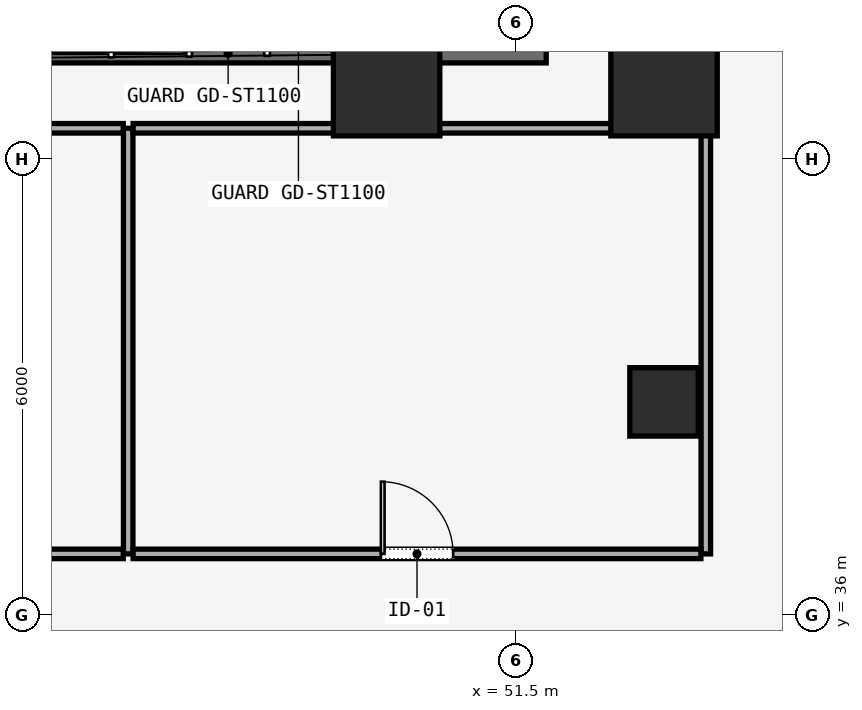
"""IFC4 building model, lengths in metres.
Left out: names, types, materials, properties, quantities, classifications, styles, units other than length and angle.
Written with IfcOpenShell. Run it as: python <this file> out.ifc"""

import sys

from ifc_helpers import new_model, si_unit, direction, frame, frame_2d, origin, origin_2d, place, context, subcontext, project, spatial, rectangle, extrude, element, fill, save


model = new_model("IFC4")
c1 = context("Model", 3, precision=1e-05, world=origin(), true_north=direction((0.0, 1.0)))
c2 = subcontext(c1, "Body", "Model", "MODEL_VIEW")
j1 = project(units=[si_unit("LENGTHUNIT", "METRE"), si_unit("PLANEANGLEUNIT", "RADIAN")], contexts=[c1])
p1 = place(None, origin())
s1 = spatial("IfcSite", under=j1, at=p1, CompositionType="ELEMENT")
p2 = place(p1, origin())
s2 = spatial("IfcBuilding", under=s1, at=p2, CompositionType="ELEMENT")
p3 = place(p2, frame((0.0, 0.0, -4.5)))
s3 = spatial("IfcBuildingStorey", under=s2, at=p3, CompositionType="ELEMENT", Elevation=-4.5)
for number, where, z_axis, x_axis in (
    (1, (49.8, 43.0, 0.0), (0.0, 0.0, 1.0), (1.0, 0.0, 0.0)),
    (2, (53.45, 43.0, 0.0), (0.0, 0.0, 1.0), (1.0, 0.0, 0.0)),
):
    element("IfcColumn", number, at=place(p3, frame(where, z_axis=z_axis, x_axis=x_axis)), inside=s3, PredefinedType="COLUMN", context=c2, shape_type="SweptSolid", body=[
        extrude(rectangle(XDim=1.4, YDim=1.4, at=origin_2d()), origin(), (0.0, 0.0, 1.0), 4.1),
    ])
p4 = place(p3, frame((53.45, 38.8, 0.0), z_axis=(0.0, 0.0, 1.0), x_axis=(1.0, 0.0, 0.0)))
e3 = element("IfcColumn", 3, at=p4, inside=s3, PredefinedType="COLUMN", context=c2, shape_type="SweptSolid", body=[
    extrude(rectangle(XDim=0.9, YDim=0.9, at=origin_2d()), origin(), (0.0, 0.0, 1.0), 4.1),
])
p5 = place(p3, frame((51.9, 43.36, 0.0), z_axis=(0.0, 0.0, 1.0), x_axis=(-1.0, 0.0, 0.0)))
e4 = element("IfcWall", 4, at=p5, inside=s3, PredefinedType="SOLIDWALL", context=c2, shape_type="SweptSolid", body=[
    extrude(rectangle(XDim=6.9, YDim=0.2, at=frame_2d((3.45, 0.0))), origin(), (0.0, 0.0, 1.0), 4.5),
])
p6 = place(p3, frame((46.4, 36.8, 0.0), z_axis=(0.0, 0.0, 1.0), x_axis=(0.0, 1.0, 0.0)))
e5 = element("IfcWall", 5, at=p6, inside=s3, PredefinedType="PARTITIONING", context=c2, shape_type="SweptSolid", body=[
    extrude(rectangle(XDim=5.6, YDim=0.125, at=frame_2d((2.8, 0.0))), origin(), (0.0, 0.0, 1.0), 3.143),
])
p7 = place(p3, frame((46.335, 42.4, 0.0), z_axis=(0.0, 0.0, 1.0), x_axis=(-1.0, 0.0, 0.0)))
e6 = element("IfcWall", 6, at=p7, inside=s3, PredefinedType="PARTITIONING", context=c2, shape_type="SweptSolid", body=[
    extrude(rectangle(XDim=8.27, YDim=0.125, at=frame_2d((4.135, 0.0))), origin(), (0.0, 0.0, 1.0), 3.143),
])
p8 = place(p3, frame((38.065, 36.8, 0.0), z_axis=(0.0, 0.0, 1.0), x_axis=(1.0, 0.0, 0.0)))
e7 = element("IfcWall", 7, at=p8, inside=s3, PredefinedType="PARTITIONING", context=c2, shape_type="SweptSolid", body=[
    extrude(rectangle(XDim=8.27, YDim=0.125, at=frame_2d((4.135, 0.0))), origin(), (0.0, 0.0, 1.0), 3.143),
])
p9 = place(p8, frame((2.76, 0.0, 0.0)))
e8 = element("IfcOpeningElement", 8, at=p9, cuts=e7, PredefinedType="OPENING", context=c2, shape_type="SweptSolid", body=[
    extrude(rectangle(XDim=0.95, YDim=2.2, at=frame_2d((0.475, 1.1))), frame((0.0, 0.062, 0.0), z_axis=(0.0, -1.0, 0.0), x_axis=(1.0, 0.0, 0.0)), (0.0, 0.0, 1.0), 0.125),
])
p10 = place(p3, frame((54.0, 36.8, 0.0), z_axis=(0.0, 0.0, 1.0), x_axis=(0.0, 1.0, 0.0)))
e9 = element("IfcWall", 9, at=p10, inside=s3, PredefinedType="PARTITIONING", context=c2, shape_type="SweptSolid", body=[
    extrude(rectangle(XDim=5.6, YDim=0.125, at=frame_2d((2.8, 0.0))), origin(), (0.0, 0.0, 1.0), 3.143),
])
p11 = place(p3, frame((53.935, 42.4, 0.0), z_axis=(0.0, 0.0, 1.0), x_axis=(-1.0, 0.0, 0.0)))
e10 = element("IfcWall", 10, at=p11, inside=s3, PredefinedType="PARTITIONING", context=c2, shape_type="SweptSolid", body=[
    extrude(rectangle(XDim=7.47, YDim=0.125, at=frame_2d((3.735, 0.0))), origin(), (0.0, 0.0, 1.0), 3.143),
])
p12 = place(p3, frame((46.465, 36.8, 0.0), z_axis=(0.0, 0.0, 1.0), x_axis=(1.0, 0.0, 0.0)))
e11 = element("IfcWall", 11, at=p12, inside=s3, PredefinedType="PARTITIONING", context=c2, shape_type="SweptSolid", body=[
    extrude(rectangle(XDim=7.47, YDim=0.125, at=frame_2d((3.735, 0.0))), origin(), (0.0, 0.0, 1.0), 3.143),
])
p13 = place(p12, frame((3.26, 0.0, 0.0)))
e12 = element("IfcOpeningElement", 12, at=p13, cuts=e11, PredefinedType="OPENING", context=c2, shape_type="SweptSolid", body=[
    extrude(rectangle(XDim=0.95, YDim=2.2, at=frame_2d((0.475, 1.1))), frame((0.0, 0.062, 0.0), z_axis=(0.0, -1.0, 0.0), x_axis=(1.0, 0.0, 0.0)), (0.0, 0.0, 1.0), 0.125),
])
p14 = place(p13, origin())
e13 = element("IfcDoor", 13, at=p14, inside=s3, OperationType="SINGLE_SWING_LEFT", PredefinedType="DOOR", context=c2, shape_type="SweptSolid", body=[
    extrude(rectangle(XDim=0.95, YDim=2.2, at=frame_2d((0.475, 1.1))), frame((0.0, 0.025, 0.0), z_axis=(0.0, -1.0, 0.0), x_axis=(1.0, 0.0, 0.0)), (0.0, 0.0, 1.0), 0.05),
])
fill(e12, e13)
save(model, sys.argv[1])
